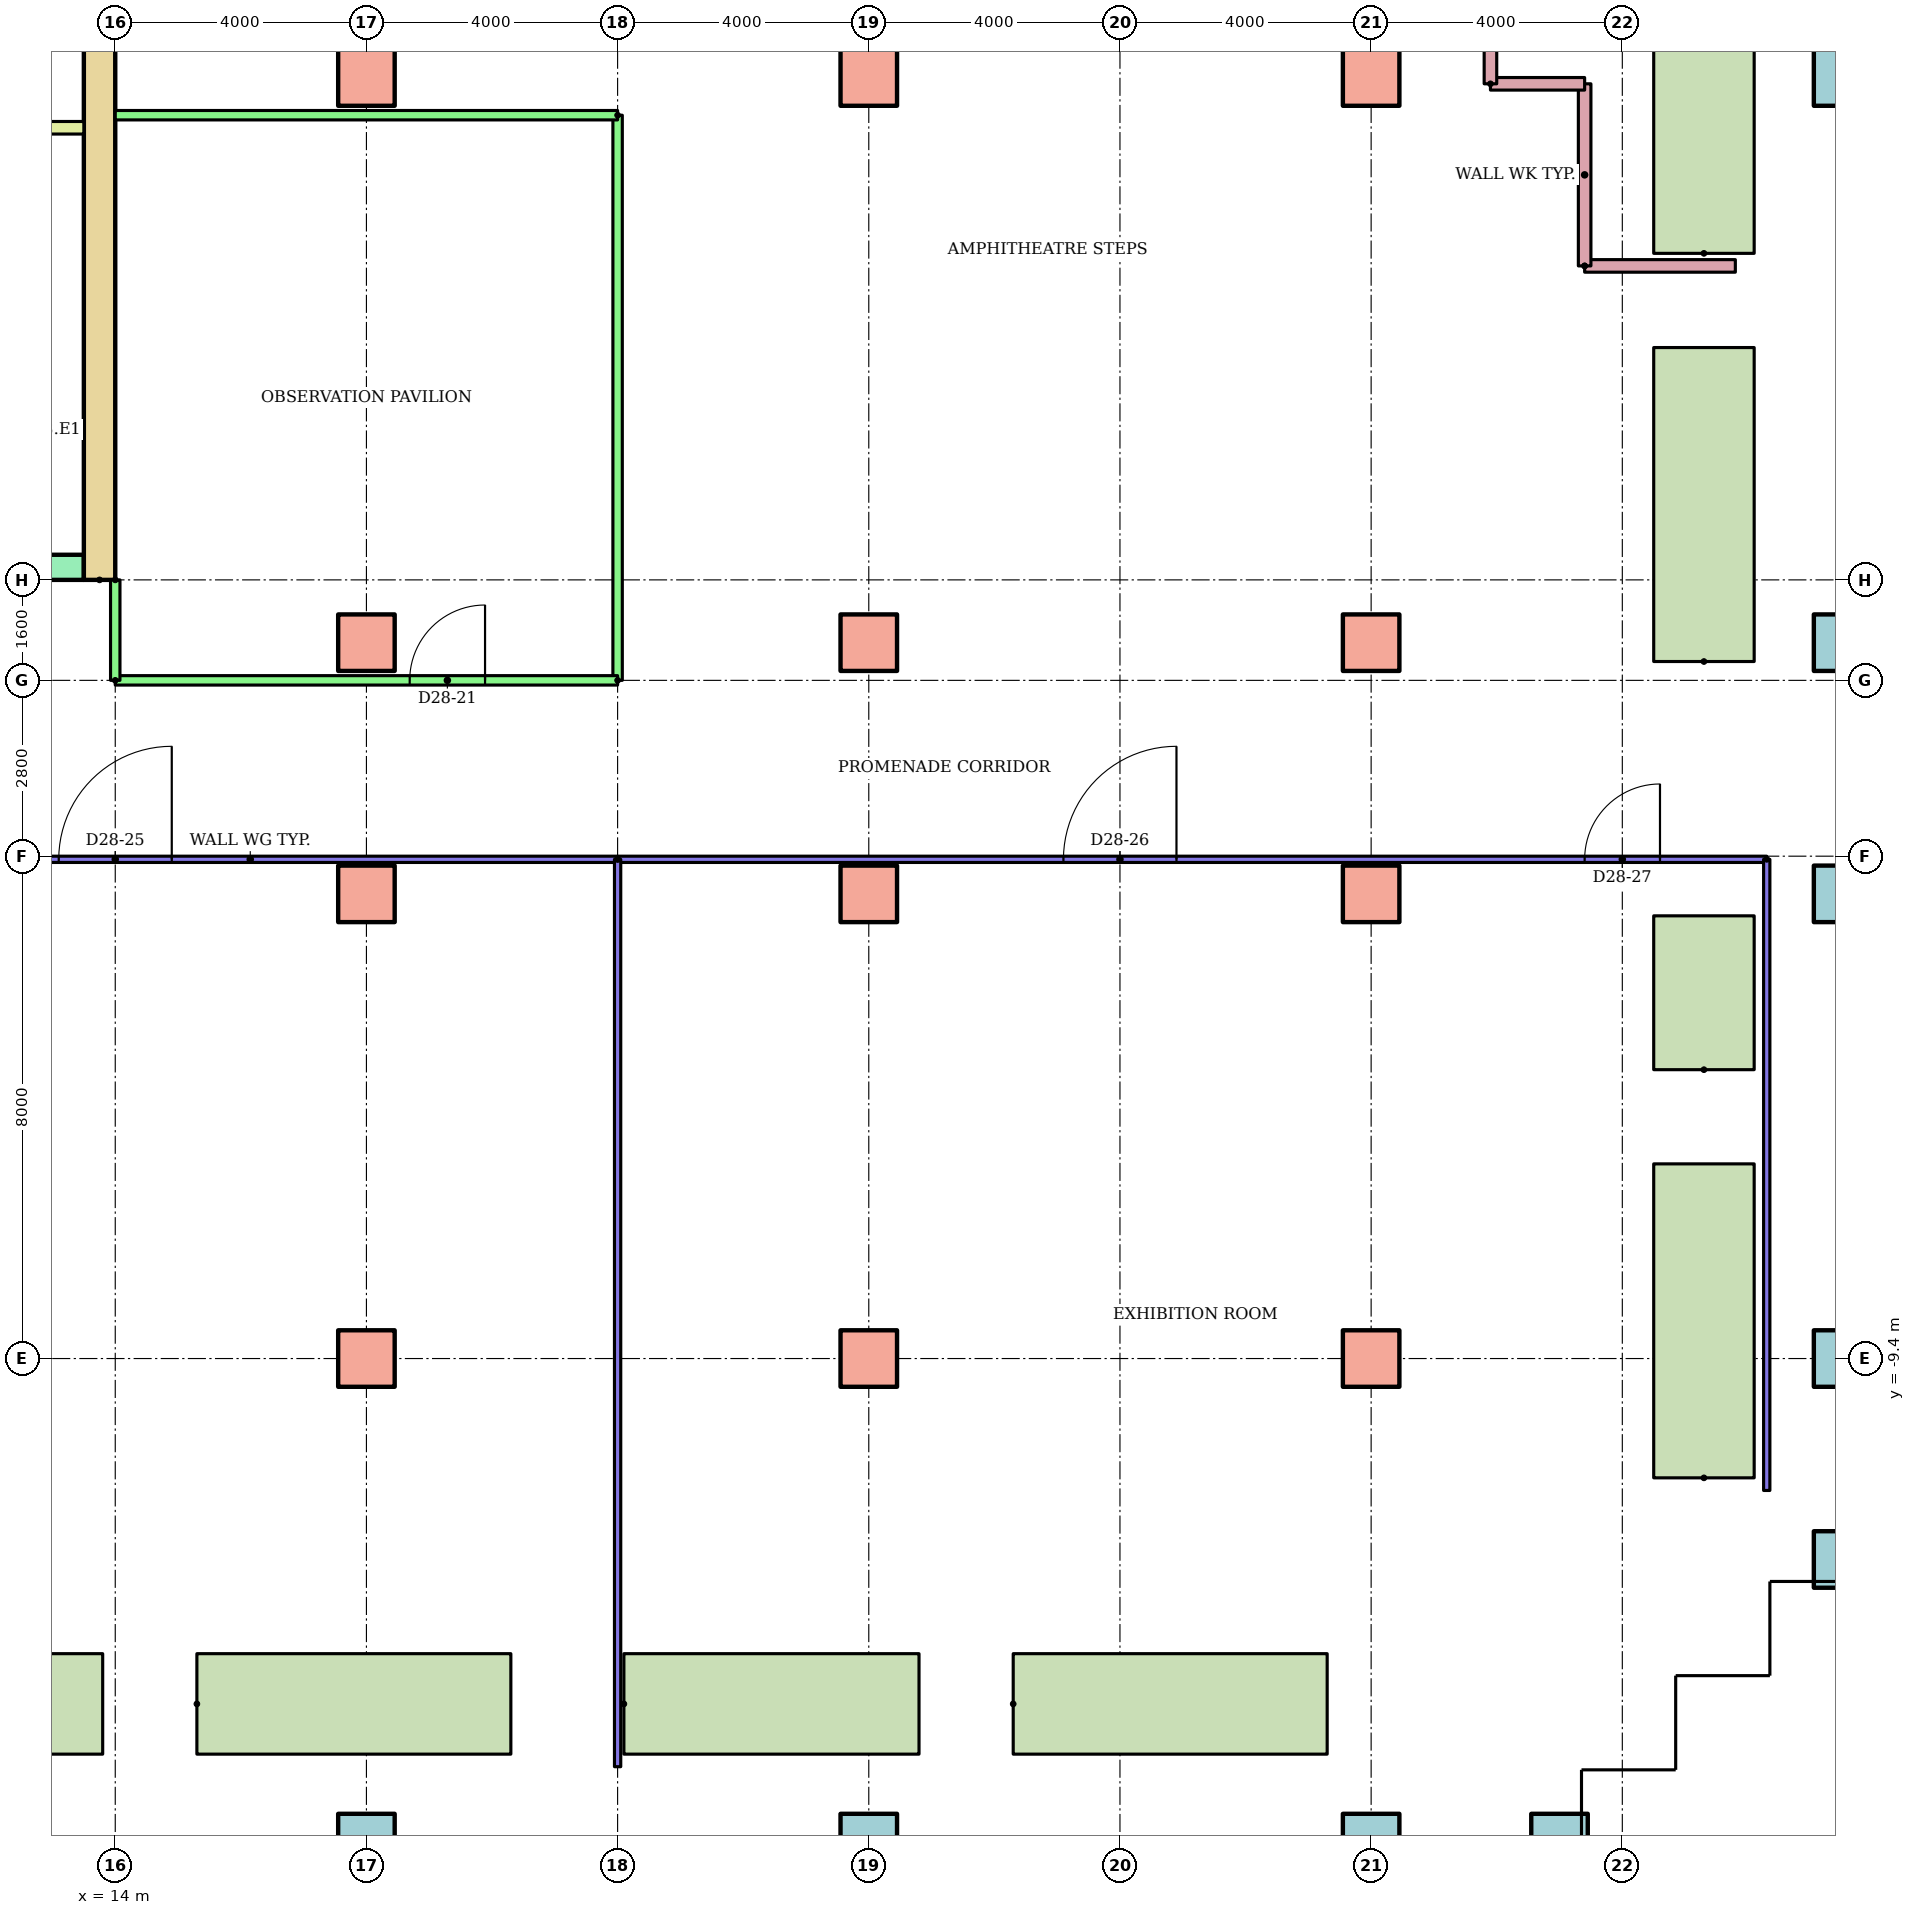
"""IFC4 building model, lengths in metres.
Left out: names, types, materials, properties, quantities, classifications, styles, units other than length and angle.
Written with IfcOpenShell. Run it as: python <this file> out.ifc"""

import sys

from ifc_helpers import new_model, si_unit, direction, frame, frame_2d, origin, origin_2d, place, context, subcontext, project, spatial, rectangle, hollow_rectangle, extrude, element, fill, save


model = new_model("IFC4")
c1 = context("Model", 3, precision=1e-05, world=origin(), true_north=direction((0.0, 1.0)))
c2 = subcontext(c1, "Body", "Model", "MODEL_VIEW")
j1 = project(units=[si_unit("LENGTHUNIT", "METRE"), si_unit("PLANEANGLEUNIT", "RADIAN")], contexts=[c1])
p1 = place(None, origin())
s1 = spatial("IfcSite", under=j1, at=p1, CompositionType="ELEMENT")
p2 = place(p1, origin())
s2 = spatial("IfcBuilding", under=s1, at=p2, CompositionType="ELEMENT")
p3 = place(p2, frame((0.0, 0.0, 106.3)))
s3 = spatial("IfcBuildingStorey", under=s2, at=p3, CompositionType="ELEMENT", Elevation=106.3)
for number, where in (
    (1, (18.0, -17.1, 0.0)),
    (2, (26.0, -17.1, 0.0)),
):
    element("IfcColumn", number, at=place(p3, frame(where)), inside=s3, PredefinedType="COLUMN", context=c2, shape_type="SweptSolid", body=[
        extrude(hollow_rectangle(XDim=0.9, YDim=0.9, WallThickness=0.045, at=origin_2d()), origin(), (0.0, 0.0, 1.0), 9.6),
    ])
p4 = place(p3, frame((34.0, -17.1, 0.0)))
e3 = element("IfcColumn", 3, at=p4, inside=s3, PredefinedType="COLUMN", context=c2, shape_type="SweptSolid", body=[
    extrude(hollow_rectangle(XDim=0.9, YDim=0.9, WallThickness=0.045, at=origin_2d()), origin(), (0.0, 0.0, 1.0), 8.8),
])
for number, where in (
    (4, (37.0, -17.1, 0.0)),
    (5, (41.5, -12.6, 0.0)),
):
    element("IfcColumn", number, at=place(p3, frame(where)), inside=s3, PredefinedType="COLUMN", context=c2, shape_type="SweptSolid", body=[
        extrude(hollow_rectangle(XDim=0.9, YDim=0.9, WallThickness=0.045, at=origin_2d()), origin(), (0.0, 0.0, 1.0), 9.25),
    ])
for number, where in (
    (6, (18.0, -9.4, 0.0)),
    (7, (26.0, -9.4, 0.0)),
):
    element("IfcColumn", number, at=place(p3, frame(where)), inside=s3, PredefinedType="COLUMN", context=c2, shape_type="SweptSolid", body=[
        extrude(rectangle(XDim=0.9, YDim=0.9, at=origin_2d()), origin(), (0.0, 0.0, 1.0), 9.6),
    ])
p5 = place(p3, frame((34.0, -9.4, 0.0)))
e8 = element("IfcColumn", 8, at=p5, inside=s3, PredefinedType="COLUMN", context=c2, shape_type="SweptSolid", body=[
    extrude(rectangle(XDim=0.9, YDim=0.9, at=origin_2d()), origin(), (0.0, 0.0, 1.0), 8.8),
])
p6 = place(p3, frame((41.5, -9.4, 0.0)))
e9 = element("IfcColumn", 9, at=p6, inside=s3, PredefinedType="COLUMN", context=c2, shape_type="SweptSolid", body=[
    extrude(hollow_rectangle(XDim=0.9, YDim=0.9, WallThickness=0.045, at=origin_2d()), origin(), (0.0, 0.0, 1.0), 9.25),
])
for number, where in (
    (10, (18.0, -2.0, 0.0)),
    (11, (26.0, -2.0, 0.0)),
):
    element("IfcColumn", number, at=place(p3, frame(where)), inside=s3, PredefinedType="COLUMN", context=c2, shape_type="SweptSolid", body=[
        extrude(rectangle(XDim=0.9, YDim=0.9, at=origin_2d()), origin(), (0.0, 0.0, 1.0), 9.6),
    ])
p7 = place(p3, frame((34.0, -2.0, 0.0)))
e12 = element("IfcColumn", 12, at=p7, inside=s3, PredefinedType="COLUMN", context=c2, shape_type="SweptSolid", body=[
    extrude(rectangle(XDim=0.9, YDim=0.9, at=origin_2d()), origin(), (0.0, 0.0, 1.0), 8.8),
])
p8 = place(p3, frame((41.5, -2.0, 0.0)))
e13 = element("IfcColumn", 13, at=p8, inside=s3, PredefinedType="COLUMN", context=c2, shape_type="SweptSolid", body=[
    extrude(hollow_rectangle(XDim=0.9, YDim=0.9, WallThickness=0.045, at=origin_2d()), origin(), (0.0, 0.0, 1.0), 9.25),
])
for number, where in (
    (14, (18.0, 2.0, 0.0)),
    (15, (26.0, 2.0, 0.0)),
):
    element("IfcColumn", number, at=place(p3, frame(where)), inside=s3, PredefinedType="COLUMN", context=c2, shape_type="SweptSolid", body=[
        extrude(rectangle(XDim=0.9, YDim=0.9, at=origin_2d()), origin(), (0.0, 0.0, 1.0), 9.6),
    ])
p9 = place(p3, frame((34.0, 2.0, 0.0)))
e16 = element("IfcColumn", 16, at=p9, inside=s3, PredefinedType="COLUMN", context=c2, shape_type="SweptSolid", body=[
    extrude(rectangle(XDim=0.9, YDim=0.9, at=origin_2d()), origin(), (0.0, 0.0, 1.0), 8.8),
])
p10 = place(p3, frame((41.5, 2.0, 0.0)))
e17 = element("IfcColumn", 17, at=p10, inside=s3, PredefinedType="COLUMN", context=c2, shape_type="SweptSolid", body=[
    extrude(hollow_rectangle(XDim=0.9, YDim=0.9, WallThickness=0.045, at=origin_2d()), origin(), (0.0, 0.0, 1.0), 9.25),
])
for number, where in (
    (18, (18.0, 11.0, 0.0)),
    (19, (26.0, 11.0, 0.0)),
):
    element("IfcColumn", number, at=place(p3, frame(where)), inside=s3, PredefinedType="COLUMN", context=c2, shape_type="SweptSolid", body=[
        extrude(rectangle(XDim=0.9, YDim=0.9, at=origin_2d()), origin(), (0.0, 0.0, 1.0), 9.6),
    ])
p11 = place(p3, frame((34.0, 11.0, 0.0)))
e20 = element("IfcColumn", 20, at=p11, inside=s3, PredefinedType="COLUMN", context=c2, shape_type="SweptSolid", body=[
    extrude(rectangle(XDim=0.9, YDim=0.9, at=origin_2d()), origin(), (0.0, 0.0, 1.0), 8.8),
])
p12 = place(p3, frame((41.5, 11.0, 0.0)))
e21 = element("IfcColumn", 21, at=p12, inside=s3, PredefinedType="COLUMN", context=c2, shape_type="SweptSolid", body=[
    extrude(hollow_rectangle(XDim=0.9, YDim=0.9, WallThickness=0.045, at=origin_2d()), origin(), (0.0, 0.0, 1.0), 9.25),
])
for number, where in (
    (22, (8.8, -14.9, 0.0)),
    (23, (15.3, -14.9, 0.0)),
    (24, (28.3, -14.9, 0.0)),
):
    element("IfcWall", number, at=place(p3, frame(where)), inside=s3, PredefinedType="STANDARD", context=c2, shape_type="SweptSolid", body=[
        extrude(rectangle(XDim=5.0, YDim=1.6, at=frame_2d((2.5, 0.0))), origin(), (0.0, 0.0, 1.0), 0.8),
    ])
for number, where, z_axis, x_axis in (
    (25, (39.3, -11.3, 0.0), (0.0, 0.0, 1.0), (0.0, 1.0, 0.0)),
    (26, (39.3, 1.7, 0.0), (0.0, 0.0, 1.0), (0.0, 1.0, 0.0)),
    (27, (39.3, 8.2, 0.0), (0.0, 0.0, 1.0), (0.0, 1.0, 0.0)),
):
    element("IfcWall", number, at=place(p3, frame(where, z_axis=z_axis, x_axis=x_axis)), inside=s3, PredefinedType="STANDARD", context=c2, shape_type="SweptSolid", body=[
        extrude(rectangle(XDim=5.0, YDim=1.6, at=frame_2d((2.5, 0.0))), origin(), (0.0, 0.0, 1.0), 0.8),
    ])
p13 = place(p3, frame((13.75, 3.0, 0.0), z_axis=(0.0, 0.0, 1.0), x_axis=(0.0, 1.0, 0.0)))
e28 = element("IfcWall", 28, at=p13, inside=s3, PredefinedType="SHEAR", context=c2, shape_type="SweptSolid", body=[
    extrude(rectangle(XDim=17.0, YDim=0.5, at=frame_2d((8.5, 0.0))), origin(), (0.0, 0.0, 1.0), 8.8),
])
p14 = place(p3, frame((-13.5, 3.2, 0.0)))
e29 = element("IfcWall", 29, at=p14, inside=s3, PredefinedType="SHEAR", context=c2, shape_type="SweptSolid", body=[
    extrude(rectangle(XDim=27.0, YDim=0.4, at=frame_2d((13.5, 0.0))), origin(), (0.0, 0.0, 1.0), 8.8),
])
p15 = place(p14, frame((6.861, 0.0, 0.0)))
e30 = element("IfcOpeningElement", 30, at=p15, cuts=e29, PredefinedType="OPENING", context=c2, shape_type="SweptSolid", body=[
    extrude(rectangle(XDim=1.1, YDim=2.1, at=frame_2d((0.55, 1.05))), frame((0.0, 0.21, 0.0), z_axis=(0.0, -1.0, 0.0), x_axis=(1.0, 0.0, 0.0)), (0.0, 0.0, 1.0), 0.42),
])
p16 = place(p14, frame((9.906, 0.0, 0.0)))
e31 = element("IfcOpeningElement", 31, at=p16, cuts=e29, PredefinedType="OPENING", context=c2, shape_type="SweptSolid", body=[
    extrude(rectangle(XDim=1.1, YDim=2.1, at=frame_2d((0.55, 1.05))), frame((0.0, 0.21, 0.0), z_axis=(0.0, -1.0, 0.0), x_axis=(1.0, 0.0, 0.0)), (0.0, 0.0, 1.0), 0.42),
])
p17 = place(p14, frame((15.994, 0.0, 0.0)))
e32 = element("IfcOpeningElement", 32, at=p17, cuts=e29, PredefinedType="OPENING", context=c2, shape_type="SweptSolid", body=[
    extrude(rectangle(XDim=1.1, YDim=2.1, at=frame_2d((0.55, 1.05))), frame((0.0, 0.21, 0.0), z_axis=(0.0, -1.0, 0.0), x_axis=(1.0, 0.0, 0.0)), (0.0, 0.0, 1.0), 0.42),
])
p18 = place(p14, frame((19.039, 0.0, 0.0)))
e33 = element("IfcOpeningElement", 33, at=p18, cuts=e29, PredefinedType="OPENING", context=c2, shape_type="SweptSolid", body=[
    extrude(rectangle(XDim=1.1, YDim=2.1, at=frame_2d((0.55, 1.05))), frame((0.0, 0.21, 0.0), z_axis=(0.0, -1.0, 0.0), x_axis=(1.0, 0.0, 0.0)), (0.0, 0.0, 1.0), 0.42),
])
p19 = place(p14, frame((12.6, 0.0, 0.0)))
e34 = element("IfcOpeningElement", 34, at=p19, cuts=e29, PredefinedType="OPENING", context=c2, shape_type="SweptSolid", body=[
    extrude(rectangle(XDim=1.8, YDim=2.1, at=frame_2d((0.9, 1.05))), frame((0.0, 0.21, 0.0), z_axis=(0.0, -1.0, 0.0), x_axis=(1.0, 0.0, 0.0)), (0.0, 0.0, 1.0), 0.42),
])
p20 = place(p3, frame((9.6, 10.2, 0.0)))
e35 = element("IfcWall", 35, at=p20, inside=s3, PredefinedType="PARTITIONING", context=c2, shape_type="SweptSolid", body=[
    extrude(rectangle(XDim=3.9, YDim=0.2, at=frame_2d((1.95, 0.0))), origin(), (0.0, 0.0, 1.0), 8.8),
])
p21 = place(p3, frame((22.0, 1.4, 0.0), z_axis=(0.0, 0.0, 1.0), x_axis=(0.0, 1.0, 0.0)))
e36 = element("IfcWall", 36, at=p21, inside=s3, PredefinedType="PARTITIONING", context=c2, shape_type="SweptSolid", body=[
    extrude(rectangle(XDim=9.0, YDim=0.15, at=frame_2d((4.5, 0.0))), origin(), (0.0, 0.0, 1.0), 8.8),
])
p22 = place(p3, frame((22.0, 10.4, 0.0), z_axis=(0.0, 0.0, 1.0), x_axis=(-1.0, 0.0, 0.0)))
e37 = element("IfcWall", 37, at=p22, inside=s3, PredefinedType="PARTITIONING", context=c2, shape_type="SweptSolid", body=[
    extrude(rectangle(XDim=8.0, YDim=0.15, at=frame_2d((4.0, 0.0))), origin(), (0.0, 0.0, 1.0), 8.8),
])
p23 = place(p3, frame((14.0, 1.4, 0.0)))
e38 = element("IfcWall", 38, at=p23, inside=s3, PredefinedType="PARTITIONING", context=c2, shape_type="SweptSolid", body=[
    extrude(rectangle(XDim=8.0, YDim=0.15, at=frame_2d((4.0, 0.0))), origin(), (0.0, 0.0, 1.0), 8.8),
])
p24 = place(p23, frame((4.689, 0.0, 0.0)))
e39 = element("IfcOpeningElement", 39, at=p24, cuts=e38, PredefinedType="OPENING", context=c2, shape_type="SweptSolid", body=[
    extrude(rectangle(XDim=1.2, YDim=2.1, at=frame_2d((0.6, 1.05))), frame((0.0, 0.085, 0.0), z_axis=(0.0, -1.0, 0.0), x_axis=(1.0, 0.0, 0.0)), (0.0, 0.0, 1.0), 0.17),
])
p25 = place(p3, frame((14.0, 3.0, 0.0), z_axis=(0.0, 0.0, 1.0), x_axis=(0.0, -1.0, 0.0)))
e40 = element("IfcWall", 40, at=p25, inside=s3, PredefinedType="PARTITIONING", context=c2, shape_type="SweptSolid", body=[
    extrude(rectangle(XDim=1.6, YDim=0.15, at=frame_2d((0.8, 0.0))), origin(), (0.0, 0.0, 1.0), 8.8),
])
p26 = place(p3, frame((0.0, -1.45, 0.0)))
e41 = element("IfcWall", 41, at=p26, inside=s3, PredefinedType="PARTITIONING", context=c2, shape_type="SweptSolid", body=[
    extrude(rectangle(XDim=22.0, YDim=0.1, at=frame_2d((11.0, 0.0))), origin(), (0.0, 0.0, 1.0), 8.8),
])
p27 = place(p26, frame((5.1, 0.0, 0.0)))
e42 = element("IfcOpeningElement", 42, at=p27, cuts=e41, PredefinedType="OPENING", context=c2, shape_type="SweptSolid", body=[
    extrude(rectangle(XDim=1.8, YDim=2.1, at=frame_2d((0.9, 1.05))), frame((0.0, 0.06, 0.0), z_axis=(0.0, -1.0, 0.0), x_axis=(1.0, 0.0, 0.0)), (0.0, 0.0, 1.0), 0.12),
])
p28 = place(p26, frame((13.1, 0.0, 0.0)))
e43 = element("IfcOpeningElement", 43, at=p28, cuts=e41, PredefinedType="OPENING", context=c2, shape_type="SweptSolid", body=[
    extrude(rectangle(XDim=1.8, YDim=2.1, at=frame_2d((0.9, 1.05))), frame((0.0, 0.06, 0.0), z_axis=(0.0, -1.0, 0.0), x_axis=(1.0, 0.0, 0.0)), (0.0, 0.0, 1.0), 0.12),
])
p29 = place(p3, frame((22.0, -1.45, 0.0)))
e44 = element("IfcWall", 44, at=p29, inside=s3, PredefinedType="PARTITIONING", context=c2, shape_type="SweptSolid", body=[
    extrude(rectangle(XDim=18.3, YDim=0.1, at=frame_2d((9.15, 0.0))), origin(), (0.0, 0.0, 1.0), 8.8),
])
p30 = place(p29, frame((7.1, 0.0, 0.0)))
e45 = element("IfcOpeningElement", 45, at=p30, cuts=e44, PredefinedType="OPENING", context=c2, shape_type="SweptSolid", body=[
    extrude(rectangle(XDim=1.8, YDim=2.1, at=frame_2d((0.9, 1.05))), frame((0.0, 0.06, 0.0), z_axis=(0.0, -1.0, 0.0), x_axis=(1.0, 0.0, 0.0)), (0.0, 0.0, 1.0), 0.12),
])
p31 = place(p29, frame((15.4, 0.0, 0.0)))
e46 = element("IfcOpeningElement", 46, at=p31, cuts=e44, PredefinedType="OPENING", context=c2, shape_type="SweptSolid", body=[
    extrude(rectangle(XDim=1.2, YDim=2.1, at=frame_2d((0.6, 1.05))), frame((0.0, 0.06, 0.0), z_axis=(0.0, -1.0, 0.0), x_axis=(1.0, 0.0, 0.0)), (0.0, 0.0, 1.0), 0.12),
])
p32 = place(p3, frame((22.0, -1.45, 0.0), z_axis=(0.0, 0.0, 1.0), x_axis=(0.0, -1.0, 0.0)))
e47 = element("IfcWall", 47, at=p32, inside=s3, PredefinedType="PARTITIONING", context=c2, shape_type="SweptSolid", body=[
    extrude(rectangle(XDim=14.45, YDim=0.1, at=frame_2d((7.225, 0.0))), origin(), (0.0, 0.0, 1.0), 8.8),
])
p33 = place(p3, frame((40.3, -1.45, 0.0), z_axis=(0.0, 0.0, 1.0), x_axis=(0.0, -1.0, 0.0)))
e48 = element("IfcWall", 48, at=p33, inside=s3, PredefinedType="PARTITIONING", context=c2, shape_type="SweptSolid", body=[
    extrude(rectangle(XDim=10.051, YDim=0.1, at=frame_2d((5.025, 0.0))), origin(), (0.0, 0.0, 1.0), 8.8),
])
p34 = place(p3, frame((37.4, 8.0, 0.0)))
e49 = element("IfcWall", 49, at=p34, inside=s3, PredefinedType="PARTITIONING", context=c2, shape_type="SweptSolid", body=[
    extrude(rectangle(XDim=2.4, YDim=0.2, at=frame_2d((1.2, 0.0))), origin(), (0.0, 0.0, 1.0), 0.9),
])
p35 = place(p3, frame((37.4, 8.0, 0.0), z_axis=(0.0, 0.0, 1.0), x_axis=(0.0, 1.0, 0.0)))
e50 = element("IfcWall", 50, at=p35, inside=s3, PredefinedType="PARTITIONING", context=c2, shape_type="SweptSolid", body=[
    extrude(rectangle(XDim=2.9, YDim=0.2, at=frame_2d((1.45, 0.0))), origin(), (0.0, 0.0, 1.0), 0.9),
])
p36 = place(p3, frame((35.9, 10.9, 0.0)))
e51 = element("IfcWall", 51, at=p36, inside=s3, PredefinedType="PARTITIONING", context=c2, shape_type="SweptSolid", body=[
    extrude(rectangle(XDim=1.5, YDim=0.2, at=frame_2d((0.75, 0.0))), origin(), (0.0, 0.0, 1.0), 0.9),
])
p37 = place(p3, frame((35.9, 12.4, 0.0), z_axis=(0.0, 0.0, 1.0), x_axis=(0.0, -1.0, 0.0)))
e52 = element("IfcWall", 52, at=p37, inside=s3, PredefinedType="PARTITIONING", context=c2, shape_type="SweptSolid", body=[
    extrude(rectangle(XDim=1.5, YDim=0.2, at=frame_2d((0.75, 0.0))), origin(), (0.0, 0.0, 1.0), 0.9),
])
p38 = place(p3, frame((22.1, -14.9, 0.0)))
e53 = element("IfcWall", 53, at=p38, inside=s3, PredefinedType="STANDARD", context=c2, shape_type="SweptSolid", body=[
    extrude(rectangle(XDim=4.7, YDim=1.6, at=frame_2d((2.35, 0.0))), origin(), (0.0, 0.0, 1.0), 0.8),
])
p39 = place(p3, frame((39.3, -4.8, 0.0), z_axis=(0.0, 0.0, 1.0), x_axis=(0.0, 1.0, 0.0)))
e54 = element("IfcWall", 54, at=p39, inside=s3, PredefinedType="STANDARD", context=c2, shape_type="SweptSolid", body=[
    extrude(rectangle(XDim=2.45, YDim=1.6, at=frame_2d((1.225, 0.0))), origin(), (0.0, 0.0, 1.0), 0.8),
])
p40 = place(p24, origin())
e55 = element("IfcDoor", 55, at=p40, inside=s3, OperationType="SINGLE_SWING_RIGHT", PredefinedType="DOOR", context=c2, shape_type="SweptSolid", body=[
    extrude(rectangle(XDim=1.2, YDim=2.1, at=frame_2d((0.6, 1.05))), frame((0.0, 0.025, 0.0), z_axis=(0.0, -1.0, 0.0), x_axis=(1.0, 0.0, 0.0)), (0.0, 0.0, 1.0), 0.05),
])
fill(e39, e55)
p41 = place(p28, origin())
e56 = element("IfcDoor", 56, at=p41, inside=s3, OperationType="DOUBLE_DOOR_SINGLE_SWING", PredefinedType="DOOR", context=c2, shape_type="SweptSolid", body=[
    extrude(rectangle(XDim=1.8, YDim=2.1, at=frame_2d((0.9, 1.05))), frame((0.0, 0.025, 0.0), z_axis=(0.0, -1.0, 0.0), x_axis=(1.0, 0.0, 0.0)), (0.0, 0.0, 1.0), 0.05),
])
fill(e43, e56)
p42 = place(p30, origin())
e57 = element("IfcDoor", 57, at=p42, inside=s3, OperationType="DOUBLE_DOOR_SINGLE_SWING", PredefinedType="DOOR", context=c2, shape_type="SweptSolid", body=[
    extrude(rectangle(XDim=1.8, YDim=2.1, at=frame_2d((0.9, 1.05))), frame((0.0, 0.025, 0.0), z_axis=(0.0, -1.0, 0.0), x_axis=(1.0, 0.0, 0.0)), (0.0, 0.0, 1.0), 0.05),
])
fill(e45, e57)
p43 = place(p31, origin())
e58 = element("IfcDoor", 58, at=p43, inside=s3, OperationType="SINGLE_SWING_RIGHT", PredefinedType="DOOR", context=c2, shape_type="SweptSolid", body=[
    extrude(rectangle(XDim=1.2, YDim=2.1, at=frame_2d((0.6, 1.05))), frame((0.0, 0.025, 0.0), z_axis=(0.0, -1.0, 0.0), x_axis=(1.0, 0.0, 0.0)), (0.0, 0.0, 1.0), 0.05),
])
fill(e46, e58)
save(model, sys.argv[1])
